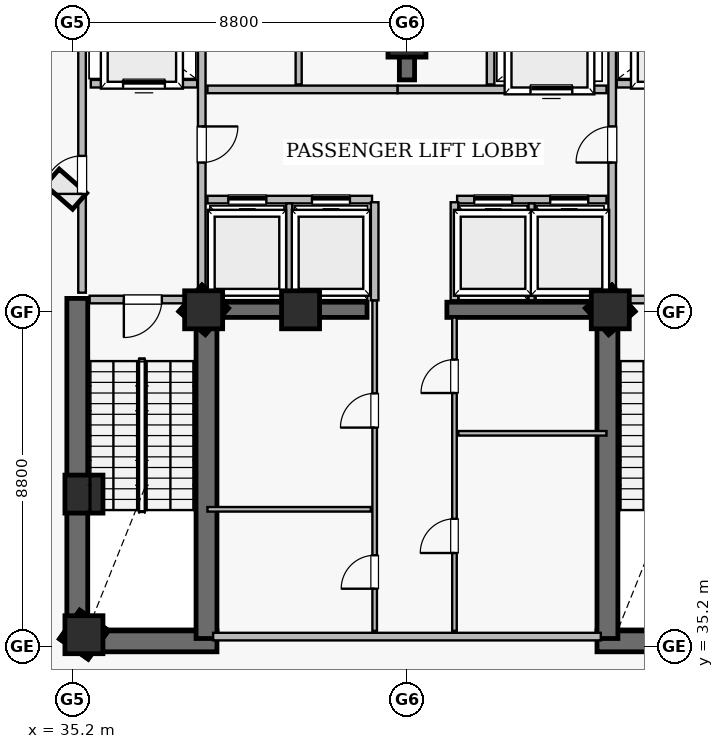
"""IFC4 building model, lengths in metres.
Left out: names, types, materials, properties, quantities, classifications, styles, units other than length and angle.
Written with IfcOpenShell. Run it as: python <this file> out.ifc"""

import sys

from ifc_helpers import new_model, si_unit, direction, frame, frame_2d, origin, origin_2d, place, context, subcontext, project, spatial, rectangle, extrude, element, fill, save


model = new_model("IFC4")
c1 = context("Model", 3, precision=1e-05, world=origin(), true_north=direction((0.0, 1.0)))
c2 = subcontext(c1, "Body", "Model", "MODEL_VIEW")
j1 = project(units=[si_unit("LENGTHUNIT", "METRE"), si_unit("PLANEANGLEUNIT", "RADIAN")], contexts=[c1])
p1 = place(None, origin())
s1 = spatial("IfcSite", under=j1, at=p1, CompositionType="ELEMENT")
p2 = place(p1, origin())
s2 = spatial("IfcBuilding", under=s1, at=p2, CompositionType="ELEMENT")
p3 = place(p2, frame((0.0, 0.0, 184.4)))
s3 = spatial("IfcBuildingStorey", under=s2, at=p3, CompositionType="ELEMENT", Elevation=184.4)
for number, where, z_axis, x_axis in (
    (1, (35.05, 35.325, 0.0), (0.0, 0.0, 1.0), (1.0, 0.0, 0.0)),
    (2, (49.0, 35.325, 0.0), (0.0, 0.0, 1.0), (1.0, 0.0, 0.0)),
):
    element("IfcWall", number, at=place(p3, frame(where, z_axis=z_axis, x_axis=x_axis)), inside=s3, PredefinedType="SHEAR", context=c2, shape_type="SweptSolid", body=[
        extrude(rectangle(XDim=3.95, YDim=0.55, at=frame_2d((1.975, 0.0))), origin(), (0.0, 0.0, 1.0), 5.1),
    ])
p4 = place(p3, frame((35.325, 35.05, 0.0), z_axis=(0.0, 0.0, 1.0), x_axis=(0.0, 1.0, 0.0)))
e3 = element("IfcWall", 3, at=p4, inside=s3, PredefinedType="SHEAR", context=c2, shape_type="SweptSolid", body=[
    extrude(rectangle(XDim=9.3, YDim=0.55, at=frame_2d((4.65, 0.0))), origin(), (0.0, 0.0, 1.0), 5.1),
])
for number, where, z_axis, x_axis in (
    (4, (38.725, 35.4, 0.0), (0.0, 0.0, 1.0), (0.0, 1.0, 0.0)),
    (5, (49.275, 35.4, 0.0), (0.0, 0.0, 1.0), (0.0, 1.0, 0.0)),
):
    element("IfcWall", number, at=place(p3, frame(where, z_axis=z_axis, x_axis=x_axis)), inside=s3, PredefinedType="SHEAR", context=c2, shape_type="SweptSolid", body=[
        extrude(rectangle(XDim=8.95, YDim=0.55, at=frame_2d((4.475, 0.0))), origin(), (0.0, 0.0, 1.0), 5.1),
    ])
p5 = place(p3, frame((44.0, 50.1, 0.0), z_axis=(0.0, 0.0, 1.0), x_axis=(0.0, 1.0, 0.0)))
e6 = element("IfcWall", 6, at=p5, inside=s3, PredefinedType="SHEAR", context=c2, shape_type="SweptSolid", body=[
    extrude(rectangle(XDim=2.1, YDim=0.4, at=frame_2d((1.05, 0.0))), origin(), (0.0, 0.0, 1.0), 5.1),
])
for number, where, z_axis, x_axis in (
    (7, (38.75, 44.05, 0.0), (0.0, 0.0, 1.0), (1.0, 0.0, 0.0)),
    (8, (45.05, 44.05, 0.0), (0.0, 0.0, 1.0), (1.0, 0.0, 0.0)),
):
    element("IfcWall", number, at=place(p3, frame(where, z_axis=z_axis, x_axis=x_axis)), inside=s3, PredefinedType="SHEAR", context=c2, shape_type="SweptSolid", body=[
        extrude(rectangle(XDim=4.2, YDim=0.4, at=frame_2d((2.1, 0.0))), origin(), (0.0, 0.0, 1.0), 5.1),
    ])
for number, where, z_axis, x_axis in (
    (9, (35.5, 35.5, 0.0), (0.0, 0.0, 1.0), (1.0, 0.0, 0.0)),
    (10, (38.65, 44.05, 0.0), (0.0, 0.0, 1.0), (1.0, 0.0, 0.0)),
    (11, (49.35, 44.05, 0.0), (0.0, 0.0, 1.0), (1.0, 0.0, 0.0)),
    (12, (44.0, 51.2, 0.0), (0.0, 0.0, 1.0), (1.0, 0.0, 0.0)),
    (13, (35.5, 39.2, 0.0), (0.0, 0.0, 1.0), (1.0, 0.0, 0.0)),
    (14, (41.2, 44.05, 0.0), (0.0, 0.0, 1.0), (1.0, 0.0, 0.0)),
):
    element("IfcColumn", number, at=place(p3, frame(where, z_axis=z_axis, x_axis=x_axis)), inside=s3, PredefinedType="COLUMN", context=c2, shape_type="SweptSolid", body=[
        extrude(rectangle(XDim=1.0, YDim=1.0, at=origin_2d()), origin(), (0.0, 0.0, 1.0), 5.4),
    ])
p6 = place(p3, frame((43.15, 35.6, 0.0), z_axis=(0.0, 0.0, 1.0), x_axis=(0.0, 1.0, 0.0)))
e15 = element("IfcWall", 15, at=p6, inside=s3, PredefinedType="PARTITIONING", context=c2, shape_type="SweptSolid", body=[
    extrude(rectangle(XDim=8.7, YDim=0.12, at=frame_2d((4.35, 0.0))), origin(), (0.0, 0.0, 1.0), 5.1),
])
p7 = place(p6, frame((1.11, 0.0, 0.0)))
e16 = element("IfcOpeningElement", 16, at=p7, cuts=e15, PredefinedType="OPENING", context=c2, shape_type="SweptSolid", body=[
    extrude(rectangle(XDim=0.88, YDim=2.1, at=frame_2d((0.44, 1.05))), frame((0.0, 0.07, 0.0), z_axis=(0.0, -1.0, 0.0), x_axis=(1.0, 0.0, 0.0)), (0.0, 0.0, 1.0), 0.14),
])
p8 = place(p6, frame((5.35, 0.0, 0.0)))
e17 = element("IfcOpeningElement", 17, at=p8, cuts=e15, PredefinedType="OPENING", context=c2, shape_type="SweptSolid", body=[
    extrude(rectangle(XDim=0.9, YDim=2.1, at=frame_2d((0.45, 1.05))), frame((0.0, 0.07, 0.0), z_axis=(0.0, -1.0, 0.0), x_axis=(1.0, 0.0, 0.0)), (0.0, 0.0, 1.0), 0.14),
])
p9 = place(p3, frame((45.25, 35.6, 0.0), z_axis=(0.0, 0.0, 1.0), x_axis=(0.0, 1.0, 0.0)))
e18 = element("IfcWall", 18, at=p9, inside=s3, PredefinedType="PARTITIONING", context=c2, shape_type="SweptSolid", body=[
    extrude(rectangle(XDim=8.25, YDim=0.12, at=frame_2d((4.125, 0.0))), origin(), (0.0, 0.0, 1.0), 5.1),
])
p10 = place(p9, frame((2.05, 0.0, 0.0)))
e19 = element("IfcOpeningElement", 19, at=p10, cuts=e18, PredefinedType="OPENING", context=c2, shape_type="SweptSolid", body=[
    extrude(rectangle(XDim=0.9, YDim=2.1, at=frame_2d((0.45, 1.05))), frame((0.0, 0.07, 0.0), z_axis=(0.0, -1.0, 0.0), x_axis=(1.0, 0.0, 0.0)), (0.0, 0.0, 1.0), 0.14),
])
p11 = place(p9, frame((6.26, 0.0, 0.0)))
e20 = element("IfcOpeningElement", 20, at=p11, cuts=e18, PredefinedType="OPENING", context=c2, shape_type="SweptSolid", body=[
    extrude(rectangle(XDim=0.88, YDim=2.1, at=frame_2d((0.44, 1.05))), frame((0.0, 0.07, 0.0), z_axis=(0.0, -1.0, 0.0), x_axis=(1.0, 0.0, 0.0)), (0.0, 0.0, 1.0), 0.14),
])
p12 = place(p3, frame((35.45, 44.5, 0.0), z_axis=(0.0, 0.0, 1.0), x_axis=(0.0, 1.0, 0.0)))
e21 = element("IfcWall", 21, at=p12, inside=s3, PredefinedType="SOLIDWALL", context=c2, shape_type="SweptSolid", body=[
    extrude(rectangle(XDim=7.92, YDim=0.2, at=frame_2d((3.96, 0.0))), origin(), (0.0, 0.0, 1.0), 5.1),
])
p13 = place(p12, frame((2.6, 0.0, 0.0)))
e22 = element("IfcOpeningElement", 22, at=p13, cuts=e21, PredefinedType="OPENING", context=c2, shape_type="SweptSolid", body=[
    extrude(rectangle(XDim=1.0, YDim=2.15, at=frame_2d((0.5, 1.075))), frame((0.0, 0.11, 0.0), z_axis=(0.0, -1.0, 0.0), x_axis=(1.0, 0.0, 0.0)), (0.0, 0.0, 1.0), 0.22),
])
p14 = place(p3, frame((38.6, 44.5, 0.0), z_axis=(0.0, 0.0, 1.0), x_axis=(0.0, 1.0, 0.0)))
e23 = element("IfcWall", 23, at=p14, inside=s3, PredefinedType="SOLIDWALL", context=c2, shape_type="SweptSolid", body=[
    extrude(rectangle(XDim=7.92, YDim=0.2, at=frame_2d((3.96, 0.0))), origin(), (0.0, 0.0, 1.0), 5.1),
])
p15 = place(p14, frame((3.425, 0.0, 0.0)))
e24 = element("IfcOpeningElement", 24, at=p15, cuts=e23, PredefinedType="OPENING", context=c2, shape_type="SweptSolid", body=[
    extrude(rectangle(XDim=0.95, YDim=2.15, at=frame_2d((0.475, 1.075))), frame((0.0, 0.11, 0.0), z_axis=(0.0, -1.0, 0.0), x_axis=(1.0, 0.0, 0.0)), (0.0, 0.0, 1.0), 0.22),
])
p16 = place(p3, frame((49.4, 44.5, 0.0), z_axis=(0.0, 0.0, 1.0), x_axis=(0.0, 1.0, 0.0)))
e25 = element("IfcWall", 25, at=p16, inside=s3, PredefinedType="SOLIDWALL", context=c2, shape_type="SweptSolid", body=[
    extrude(rectangle(XDim=7.92, YDim=0.2, at=frame_2d((3.96, 0.0))), origin(), (0.0, 0.0, 1.0), 4.188),
])
p17 = place(p16, frame((3.425, 0.0, 0.0)))
e26 = element("IfcOpeningElement", 26, at=p17, cuts=e25, PredefinedType="OPENING", context=c2, shape_type="SweptSolid", body=[
    extrude(rectangle(XDim=0.95, YDim=2.15, at=frame_2d((0.475, 1.075))), frame((0.0, 0.11, 0.0), z_axis=(0.0, -1.0, 0.0), x_axis=(1.0, 0.0, 0.0)), (0.0, 0.0, 1.0), 0.22),
])
p18 = place(p3, frame((43.75, 49.85, 0.0), z_axis=(0.0, 0.0, 1.0), x_axis=(1.0, 0.0, 0.0)))
e27 = element("IfcWall", 27, at=p18, inside=s3, PredefinedType="SOLIDWALL", context=c2, shape_type="SweptSolid", body=[
    extrude(rectangle(XDim=5.5, YDim=0.2, at=frame_2d((2.75, 0.0))), origin(), (0.0, 0.0, 1.0), 4.188),
])
p19 = place(p18, frame((3.5, 0.0, 0.0)))
e28 = element("IfcOpeningElement", 28, at=p19, cuts=e27, PredefinedType="OPENING", context=c2, shape_type="SweptSolid", body=[
    extrude(rectangle(XDim=1.1, YDim=2.15, at=frame_2d((0.55, 1.075))), frame((0.0, 0.11, 0.0), z_axis=(0.0, -1.0, 0.0), x_axis=(1.0, 0.0, 0.0)), (0.0, 0.0, 1.0), 0.22),
])
p20 = place(p3, frame((38.75, 46.95, 0.0), z_axis=(0.0, 0.0, 1.0), x_axis=(1.0, 0.0, 0.0)))
e29 = element("IfcWall", 29, at=p20, inside=s3, PredefinedType="SOLIDWALL", context=c2, shape_type="SweptSolid", body=[
    extrude(rectangle(XDim=4.33, YDim=0.2, at=frame_2d((2.165, 0.0))), origin(), (0.0, 0.0, 1.0), 5.1),
])
p21 = place(p20, frame((0.55, 0.0, 0.0)))
e30 = element("IfcOpeningElement", 30, at=p21, cuts=e29, PredefinedType="OPENING", context=c2, shape_type="SweptSolid", body=[
    extrude(rectangle(XDim=1.0, YDim=2.15, at=frame_2d((0.5, 1.075))), frame((0.0, 0.11, 0.0), z_axis=(0.0, -1.0, 0.0), x_axis=(1.0, 0.0, 0.0)), (0.0, 0.0, 1.0), 0.22),
])
p22 = place(p20, frame((2.75, 0.0, 0.0)))
e31 = element("IfcOpeningElement", 31, at=p22, cuts=e29, PredefinedType="OPENING", context=c2, shape_type="SweptSolid", body=[
    extrude(rectangle(XDim=1.0, YDim=2.15, at=frame_2d((0.5, 1.075))), frame((0.0, 0.11, 0.0), z_axis=(0.0, -1.0, 0.0), x_axis=(1.0, 0.0, 0.0)), (0.0, 0.0, 1.0), 0.22),
])
p23 = place(p3, frame((45.32, 46.95, 0.0), z_axis=(0.0, 0.0, 1.0), x_axis=(1.0, 0.0, 0.0)))
e32 = element("IfcWall", 32, at=p23, inside=s3, PredefinedType="SOLIDWALL", context=c2, shape_type="SweptSolid", body=[
    extrude(rectangle(XDim=3.93, YDim=0.2, at=frame_2d((1.965, 0.0))), origin(), (0.0, 0.0, 1.0), 4.188),
])
p24 = place(p23, frame((0.45, 0.0, 0.0)))
e33 = element("IfcOpeningElement", 33, at=p24, cuts=e32, PredefinedType="OPENING", context=c2, shape_type="SweptSolid", body=[
    extrude(rectangle(XDim=1.0, YDim=2.15, at=frame_2d((0.5, 1.075))), frame((0.0, 0.11, 0.0), z_axis=(0.0, -1.0, 0.0), x_axis=(1.0, 0.0, 0.0)), (0.0, 0.0, 1.0), 0.22),
])
p25 = place(p23, frame((2.45, 0.0, 0.0)))
e34 = element("IfcOpeningElement", 34, at=p25, cuts=e32, PredefinedType="OPENING", context=c2, shape_type="SweptSolid", body=[
    extrude(rectangle(XDim=1.0, YDim=2.15, at=frame_2d((0.5, 1.075))), frame((0.0, 0.11, 0.0), z_axis=(0.0, -1.0, 0.0), x_axis=(1.0, 0.0, 0.0)), (0.0, 0.0, 1.0), 0.22),
])
p26 = place(p3, frame((35.65, 44.32, 0.0), z_axis=(0.0, 0.0, 1.0), x_axis=(1.0, 0.0, 0.0)))
e35 = element("IfcWall", 35, at=p26, inside=s3, PredefinedType="SOLIDWALL", context=c2, shape_type="SweptSolid", body=[
    extrude(rectangle(XDim=2.8, YDim=0.2, at=frame_2d((1.4, 0.0))), origin(), (0.0, 0.0, 1.0), 5.1),
])
p27 = place(p26, frame((0.9, 0.0, 0.0)))
e36 = element("IfcOpeningElement", 36, at=p27, cuts=e35, PredefinedType="OPENING", context=c2, shape_type="SweptSolid", body=[
    extrude(rectangle(XDim=1.0, YDim=2.15, at=frame_2d((0.5, 1.075))), frame((0.0, 0.11, 0.0), z_axis=(0.0, -1.0, 0.0), x_axis=(1.0, 0.0, 0.0)), (0.0, 0.0, 1.0), 0.22),
])
p28 = place(p3, frame((49.55, 44.32, 0.0), z_axis=(0.0, 0.0, 1.0), x_axis=(1.0, 0.0, 0.0)))
e37 = element("IfcWall", 37, at=p28, inside=s3, PredefinedType="SOLIDWALL", context=c2, shape_type="SweptSolid", body=[
    extrude(rectangle(XDim=2.8, YDim=0.2, at=frame_2d((1.4, 0.0))), origin(), (0.0, 0.0, 1.0), 4.188),
])
p29 = place(p28, frame((0.9, 0.0, 0.0)))
e38 = element("IfcOpeningElement", 38, at=p29, cuts=e37, PredefinedType="OPENING", context=c2, shape_type="SweptSolid", body=[
    extrude(rectangle(XDim=1.0, YDim=2.15, at=frame_2d((0.5, 1.075))), frame((0.0, 0.11, 0.0), z_axis=(0.0, -1.0, 0.0), x_axis=(1.0, 0.0, 0.0)), (0.0, 0.0, 1.0), 0.22),
])
p30 = place(p3, frame((35.68, 50.0, 0.0), z_axis=(0.0, 0.0, 1.0), x_axis=(1.0, 0.0, 0.0)))
e39 = element("IfcWall", 39, at=p30, inside=s3, PredefinedType="SOLIDWALL", context=c2, shape_type="SweptSolid", body=[
    extrude(rectangle(XDim=2.8, YDim=0.2, at=frame_2d((1.4, 0.0))), origin(), (0.0, 0.0, 1.0), 5.1),
])
p31 = place(p30, frame((0.85, 0.0, 0.0)))
e40 = element("IfcOpeningElement", 40, at=p31, cuts=e39, PredefinedType="OPENING", context=c2, shape_type="SweptSolid", body=[
    extrude(rectangle(XDim=1.1, YDim=2.15, at=frame_2d((0.55, 1.075))), frame((0.0, 0.11, 0.0), z_axis=(0.0, -1.0, 0.0), x_axis=(1.0, 0.0, 0.0)), (0.0, 0.0, 1.0), 0.22),
])
p32 = place(p3, frame((49.52, 50.0, 0.0), z_axis=(0.0, 0.0, 1.0), x_axis=(1.0, 0.0, 0.0)))
e41 = element("IfcWall", 41, at=p32, inside=s3, PredefinedType="SOLIDWALL", context=c2, shape_type="SweptSolid", body=[
    extrude(rectangle(XDim=2.8, YDim=0.2, at=frame_2d((1.4, 0.0))), origin(), (0.0, 0.0, 1.0), 5.1),
])
p33 = place(p32, frame((0.85, 0.0, 0.0)))
e42 = element("IfcOpeningElement", 42, at=p33, cuts=e41, PredefinedType="OPENING", context=c2, shape_type="SweptSolid", body=[
    extrude(rectangle(XDim=1.1, YDim=2.15, at=frame_2d((0.55, 1.075))), frame((0.0, 0.11, 0.0), z_axis=(0.0, -1.0, 0.0), x_axis=(1.0, 0.0, 0.0)), (0.0, 0.0, 1.0), 0.22),
])
p34 = place(p3, frame((38.9, 35.45, 0.0), z_axis=(0.0, 0.0, 1.0), x_axis=(1.0, 0.0, 0.0)))
e43 = element("IfcWall", 43, at=p34, inside=s3, PredefinedType="SOLIDWALL", context=c2, shape_type="SweptSolid", body=[
    extrude(rectangle(XDim=10.2, YDim=0.2, at=frame_2d((5.1, 0.0))), origin(), (0.0, 0.0, 1.0), 5.1),
])
p35 = place(p3, frame((38.75, 49.85, 0.0), z_axis=(0.0, 0.0, 1.0), x_axis=(1.0, 0.0, 0.0)))
e44 = element("IfcWall", 44, at=p35, inside=s3, PredefinedType="SOLIDWALL", context=c2, shape_type="SweptSolid", body=[
    extrude(rectangle(XDim=5.0, YDim=0.2, at=frame_2d((2.5, 0.0))), origin(), (0.0, 0.0, 1.0), 5.1),
])
p36 = place(p3, frame((38.75, 38.8, 0.0), z_axis=(0.0, 0.0, 1.0), x_axis=(1.0, 0.0, 0.0)))
e45 = element("IfcWall", 45, at=p36, inside=s3, PredefinedType="PARTITIONING", context=c2, shape_type="SweptSolid", body=[
    extrude(rectangle(XDim=4.3, YDim=0.12, at=frame_2d((2.15, 0.0))), origin(), (0.0, 0.0, 1.0), 5.1),
])
p37 = place(p3, frame((45.35, 40.8, 0.0), z_axis=(0.0, 0.0, 1.0), x_axis=(1.0, 0.0, 0.0)))
e46 = element("IfcWall", 46, at=p37, inside=s3, PredefinedType="PARTITIONING", context=c2, shape_type="SweptSolid", body=[
    extrude(rectangle(XDim=3.9, YDim=0.12, at=frame_2d((1.95, 0.0))), origin(), (0.0, 0.0, 1.0), 5.1),
])
for number, where, z_axis, x_axis in (
    (47, (43.15, 44.3, 0.0), (0.0, 0.0, 1.0), (0.0, 1.0, 0.0)),
    (48, (45.25, 44.3, 0.0), (0.0, 0.0, 1.0), (0.0, 1.0, 0.0)),
):
    element("IfcWall", number, at=place(p3, frame(where, z_axis=z_axis, x_axis=x_axis)), inside=s3, PredefinedType="SOLIDWALL", context=c2, shape_type="SweptSolid", body=[
        extrude(rectangle(XDim=2.58, YDim=0.2, at=frame_2d((1.29, 0.0))), origin(), (0.0, 0.0, 1.0), 5.1),
    ])
p38 = place(p3, frame((40.9, 44.3, 0.0), z_axis=(0.0, 0.0, 1.0), x_axis=(0.0, 1.0, 0.0)))
e49 = element("IfcWall", 49, at=p38, inside=s3, PredefinedType="SOLIDWALL", context=c2, shape_type="SweptSolid", body=[
    extrude(rectangle(XDim=2.55, YDim=0.16, at=frame_2d((1.275, 0.0))), origin(), (0.0, 0.0, 1.0), 5.1),
])
p39 = place(p3, frame((47.28, 44.3, 0.0), z_axis=(0.0, 0.0, 1.0), x_axis=(0.0, 1.0, 0.0)))
e50 = element("IfcWall", 50, at=p39, inside=s3, PredefinedType="SOLIDWALL", context=c2, shape_type="SweptSolid", body=[
    extrude(rectangle(XDim=2.55, YDim=0.16, at=frame_2d((1.275, 0.0))), origin(), (0.0, 0.0, 1.0), 4.188),
])
p40 = place(p3, frame((41.15, 49.98, 0.0), z_axis=(0.0, 0.0, 1.0), x_axis=(0.0, 1.0, 0.0)))
e51 = element("IfcWall", 51, at=p40, inside=s3, PredefinedType="SOLIDWALL", context=c2, shape_type="SweptSolid", body=[
    extrude(rectangle(XDim=2.37, YDim=0.16, at=frame_2d((1.185, 0.0))), origin(), (0.0, 0.0, 1.0), 5.1),
])
p41 = place(p3, frame((46.2, 49.98, 0.0), z_axis=(0.0, 0.0, 1.0), x_axis=(0.0, 1.0, 0.0)))
e52 = element("IfcWall", 52, at=p41, inside=s3, PredefinedType="SOLIDWALL", context=c2, shape_type="SweptSolid", body=[
    extrude(rectangle(XDim=2.37, YDim=0.2, at=frame_2d((1.185, 0.0))), origin(), (0.0, 0.0, 1.0), 5.1),
])
p42 = place(p27, frame((1.0, 0.0, 0.0), z_axis=(0.0, 0.0, 1.0), x_axis=(-1.0, 0.0, 0.0)))
e53 = element("IfcDoor", 53, at=p42, inside=s3, OperationType="SINGLE_SWING_LEFT", PredefinedType="DOOR", context=c2, shape_type="SweptSolid", body=[
    extrude(rectangle(XDim=1.0, YDim=2.15, at=frame_2d((0.5, 1.075))), frame((0.0, 0.025, 0.0), z_axis=(0.0, -1.0, 0.0), x_axis=(1.0, 0.0, 0.0)), (0.0, 0.0, 1.0), 0.05),
])
fill(e36, e53)
p43 = place(p13, origin())
e54 = element("IfcDoor", 54, at=p43, inside=s3, OperationType="SINGLE_SWING_LEFT", PredefinedType="DOOR", context=c2, shape_type="SweptSolid", body=[
    extrude(rectangle(XDim=1.0, YDim=2.15, at=frame_2d((0.5, 1.075))), frame((0.0, 0.025, 0.0), z_axis=(0.0, -1.0, 0.0), x_axis=(1.0, 0.0, 0.0)), (0.0, 0.0, 1.0), 0.05),
])
fill(e22, e54)
p44 = place(p15, frame((0.95, 0.0, 0.0), z_axis=(0.0, 0.0, 1.0), x_axis=(-1.0, 0.0, 0.0)))
e55 = element("IfcDoor", 55, at=p44, inside=s3, OperationType="SINGLE_SWING_RIGHT", PredefinedType="DOOR", context=c2, shape_type="SweptSolid", body=[
    extrude(rectangle(XDim=0.95, YDim=2.15, at=frame_2d((0.475, 1.075))), frame((0.0, 0.025, 0.0), z_axis=(0.0, -1.0, 0.0), x_axis=(1.0, 0.0, 0.0)), (0.0, 0.0, 1.0), 0.05),
])
fill(e24, e55)
p45 = place(p17, origin())
e56 = element("IfcDoor", 56, at=p45, inside=s3, OperationType="SINGLE_SWING_LEFT", PredefinedType="DOOR", context=c2, shape_type="SweptSolid", body=[
    extrude(rectangle(XDim=0.95, YDim=2.15, at=frame_2d((0.475, 1.075))), frame((0.0, 0.025, 0.0), z_axis=(0.0, -1.0, 0.0), x_axis=(1.0, 0.0, 0.0)), (0.0, 0.0, 1.0), 0.05),
])
fill(e26, e56)
p46 = place(p31, origin())
e57 = element("IfcDoor", 57, at=p46, inside=s3, OperationType="SLIDING_TO_LEFT", PredefinedType="DOOR", context=c2, shape_type="SweptSolid", body=[
    extrude(rectangle(XDim=1.1, YDim=2.15, at=frame_2d((0.55, 1.075))), frame((0.0, 0.025, 0.0), z_axis=(0.0, -1.0, 0.0), x_axis=(1.0, 0.0, 0.0)), (0.0, 0.0, 1.0), 0.05),
])
fill(e40, e57)
p47 = place(p19, origin())
e58 = element("IfcDoor", 58, at=p47, inside=s3, OperationType="SLIDING_TO_LEFT", PredefinedType="DOOR", context=c2, shape_type="SweptSolid", body=[
    extrude(rectangle(XDim=1.1, YDim=2.15, at=frame_2d((0.55, 1.075))), frame((0.0, 0.025, 0.0), z_axis=(0.0, -1.0, 0.0), x_axis=(1.0, 0.0, 0.0)), (0.0, 0.0, 1.0), 0.05),
])
fill(e28, e58)
p48 = place(p21, origin())
e59 = element("IfcDoor", 59, at=p48, inside=s3, OperationType="SLIDING_TO_LEFT", PredefinedType="DOOR", context=c2, shape_type="SweptSolid", body=[
    extrude(rectangle(XDim=1.0, YDim=2.15, at=frame_2d((0.5, 1.075))), frame((0.0, 0.025, 0.0), z_axis=(0.0, -1.0, 0.0), x_axis=(1.0, 0.0, 0.0)), (0.0, 0.0, 1.0), 0.05),
])
fill(e30, e59)
p49 = place(p22, origin())
e60 = element("IfcDoor", 60, at=p49, inside=s3, OperationType="SLIDING_TO_LEFT", PredefinedType="DOOR", context=c2, shape_type="SweptSolid", body=[
    extrude(rectangle(XDim=1.0, YDim=2.15, at=frame_2d((0.5, 1.075))), frame((0.0, 0.025, 0.0), z_axis=(0.0, -1.0, 0.0), x_axis=(1.0, 0.0, 0.0)), (0.0, 0.0, 1.0), 0.05),
])
fill(e31, e60)
p50 = place(p24, origin())
e61 = element("IfcDoor", 61, at=p50, inside=s3, OperationType="SLIDING_TO_LEFT", PredefinedType="DOOR", context=c2, shape_type="SweptSolid", body=[
    extrude(rectangle(XDim=1.0, YDim=2.15, at=frame_2d((0.5, 1.075))), frame((0.0, 0.025, 0.0), z_axis=(0.0, -1.0, 0.0), x_axis=(1.0, 0.0, 0.0)), (0.0, 0.0, 1.0), 0.05),
])
fill(e33, e61)
p51 = place(p25, origin())
e62 = element("IfcDoor", 62, at=p51, inside=s3, OperationType="SLIDING_TO_LEFT", PredefinedType="DOOR", context=c2, shape_type="SweptSolid", body=[
    extrude(rectangle(XDim=1.0, YDim=2.15, at=frame_2d((0.5, 1.075))), frame((0.0, 0.025, 0.0), z_axis=(0.0, -1.0, 0.0), x_axis=(1.0, 0.0, 0.0)), (0.0, 0.0, 1.0), 0.05),
])
fill(e34, e62)
p52 = place(p7, origin())
e63 = element("IfcDoor", 63, at=p52, inside=s3, OperationType="SINGLE_SWING_LEFT", PredefinedType="DOOR", context=c2, shape_type="SweptSolid", body=[
    extrude(rectangle(XDim=0.88, YDim=2.1, at=frame_2d((0.44, 1.05))), frame((0.0, 0.025, 0.0), z_axis=(0.0, -1.0, 0.0), x_axis=(1.0, 0.0, 0.0)), (0.0, 0.0, 1.0), 0.05),
])
fill(e16, e63)
p53 = place(p8, origin())
e64 = element("IfcDoor", 64, at=p53, inside=s3, OperationType="SINGLE_SWING_LEFT", PredefinedType="DOOR", context=c2, shape_type="SweptSolid", body=[
    extrude(rectangle(XDim=0.9, YDim=2.1, at=frame_2d((0.45, 1.05))), frame((0.0, 0.025, 0.0), z_axis=(0.0, -1.0, 0.0), x_axis=(1.0, 0.0, 0.0)), (0.0, 0.0, 1.0), 0.05),
])
fill(e17, e64)
p54 = place(p10, origin())
e65 = element("IfcDoor", 65, at=p54, inside=s3, OperationType="SINGLE_SWING_LEFT", PredefinedType="DOOR", context=c2, shape_type="SweptSolid", body=[
    extrude(rectangle(XDim=0.9, YDim=2.1, at=frame_2d((0.45, 1.05))), frame((0.0, 0.025, 0.0), z_axis=(0.0, -1.0, 0.0), x_axis=(1.0, 0.0, 0.0)), (0.0, 0.0, 1.0), 0.05),
])
fill(e19, e65)
p55 = place(p11, origin())
e66 = element("IfcDoor", 66, at=p55, inside=s3, OperationType="SINGLE_SWING_LEFT", PredefinedType="DOOR", context=c2, shape_type="SweptSolid", body=[
    extrude(rectangle(XDim=0.88, YDim=2.1, at=frame_2d((0.44, 1.05))), frame((0.0, 0.025, 0.0), z_axis=(0.0, -1.0, 0.0), x_axis=(1.0, 0.0, 0.0)), (0.0, 0.0, 1.0), 0.05),
])
fill(e20, e66)
save(model, sys.argv[1])
